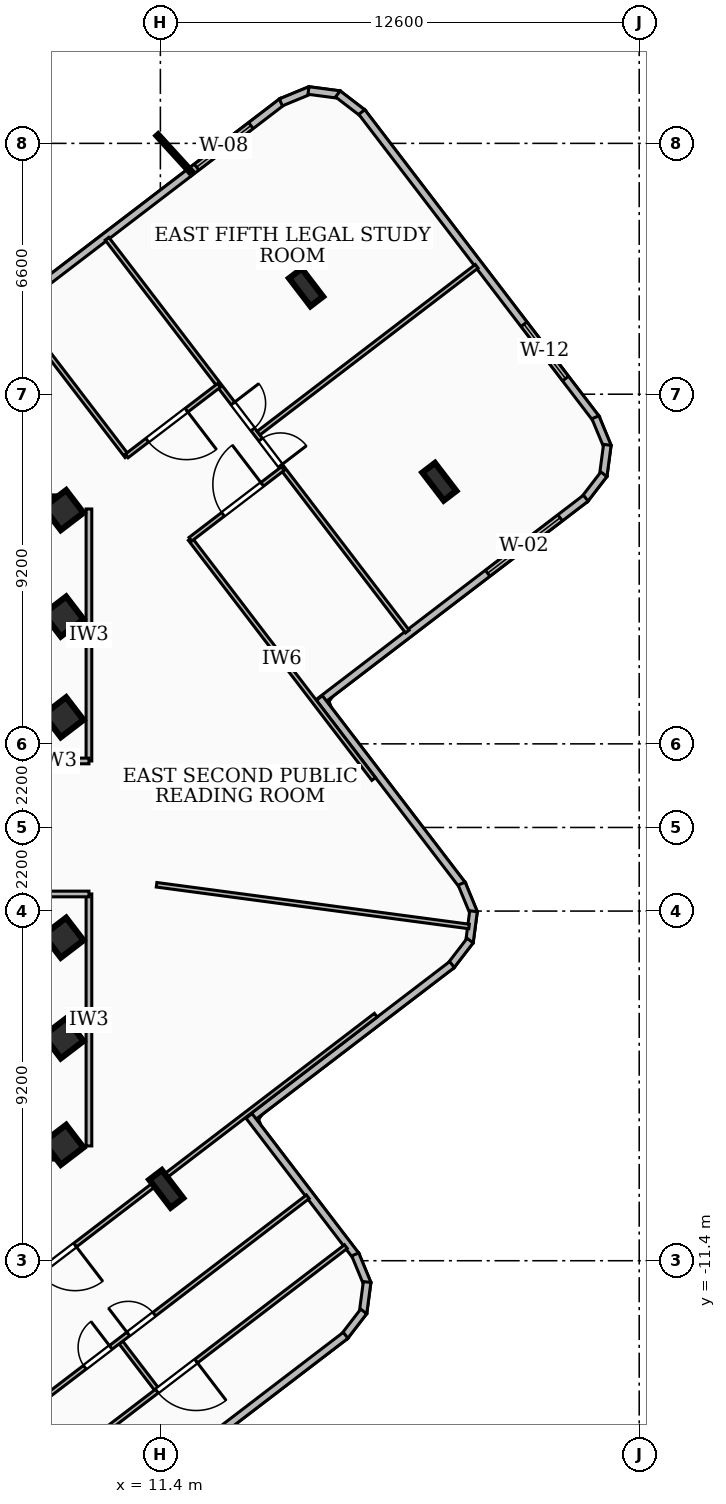
"""IFC4 building model, lengths in metres.
Left out: names, types, materials, properties, quantities, classifications, styles, units other than length and angle.
Written with IfcOpenShell. Run it as: python <this file> out.ifc"""

import sys

from ifc_helpers import new_model, si_unit, direction, frame, frame_2d, origin, origin_2d, place, context, subcontext, project, spatial, rectangle, i_section, extrude, element, fill, save


model = new_model("IFC4")
c1 = context("Model", 3, precision=1e-05, world=origin(), true_north=direction((0.0, 1.0)))
c2 = subcontext(c1, "Body", "Model", "MODEL_VIEW")
j1 = project(units=[si_unit("LENGTHUNIT", "METRE"), si_unit("PLANEANGLEUNIT", "RADIAN")], contexts=[c1])
p1 = place(None, origin())
s1 = spatial("IfcSite", under=j1, at=p1, CompositionType="ELEMENT")
p2 = place(p1, origin())
s2 = spatial("IfcBuilding", under=s1, at=p2, CompositionType="ELEMENT")
p3 = place(p2, frame((0.0, 0.0, 229.14)))
s3 = spatial("IfcBuildingStorey", under=s2, at=p3, CompositionType="ELEMENT", Elevation=229.14)
for number, where, z_axis, x_axis in (
    (1, (-8.78, 8.51, 0.0), (0.0, 0.0, 1.0), (1.0, 0.0, 0.0)),
    (2, (8.78, -8.51, 0.0), (0.0, 0.0, 1.0), (-1.0, 0.0, 0.0)),
):
    element("IfcWall", number, at=place(p3, frame(where, z_axis=z_axis, x_axis=x_axis)), inside=s3, PredefinedType="SHEAR", context=c2, shape_type="SweptSolid", body=[
        extrude(rectangle(XDim=17.56, YDim=0.4, at=frame_2d((8.78, 0.0))), origin(), (0.0, 0.0, 1.0), 3.14),
    ])
for number, where, z_axis, x_axis in (
    (3, (8.85, -5.55, 0.0), (0.0, 0.0, 1.0), (0.794, 0.607, 0.0)),
    (4, (8.85, -2.9, 0.0), (0.0, 0.0, 1.0), (0.794, 0.607, 0.0)),
    (5, (8.85, 2.9, 0.0), (0.0, 0.0, 1.0), (0.794, 0.607, 0.0)),
    (6, (8.85, 5.55, 0.0), (0.0, 0.0, 1.0), (0.794, 0.607, 0.0)),
    (7, (8.85, -8.35, 0.0), (0.0, 0.0, 1.0), (0.794, 0.607, 0.0)),
    (8, (8.85, 8.35, 0.0), (0.0, 0.0, 1.0), (0.794, 0.607, 0.0)),
):
    element("IfcColumn", number, at=place(p3, frame(where, z_axis=z_axis, x_axis=x_axis)), inside=s3, PredefinedType="COLUMN", context=c2, shape_type="SweptSolid", body=[
        extrude(rectangle(XDim=0.75, YDim=0.75, at=origin_2d()), origin(), (0.0, 0.0, 1.0), 3.42),
    ])
for number, where, z_axis, x_axis in (
    (9, (18.741, 9.097, 0.0), (0.0, 0.0, 1.0), (0.794, 0.607, 0.0)),
    (10, (15.234, 14.209, 0.0), (0.0, 0.0, 1.0), (0.794, 0.607, 0.0)),
    (11, (11.554, -9.51, 0.0), (0.0, 0.0, 1.0), (0.794, 0.607, 0.0)),
):
    element("IfcColumn", number, at=place(p3, frame(where, z_axis=z_axis, x_axis=x_axis)), inside=s3, PredefinedType="COLUMN", context=c2, shape_type="SweptSolid", body=[
        extrude(i_section(OverallWidth=0.418, OverallDepth=0.927, WebThickness=0.019, FlangeThickness=0.032, at=origin_2d()), origin(), (0.0, 0.0, 1.0), 3.42),
    ])
p4 = place(p3, frame((7.589, 13.732, 0.0), z_axis=(0.0, 0.0, 1.0), x_axis=(0.794365670067, 0.607439858932, 0.0)))
e12 = element("IfcWall", 12, at=p4, inside=s3, PredefinedType="SOLIDWALL", context=c2, shape_type="SweptSolid", body=[
    extrude(rectangle(XDim=8.842, YDim=0.2, at=frame_2d((4.421, 0.0))), origin(), (0.0, 0.0, 1.0), 3.14),
])
p5 = place(p4, frame((5.997, 0.0, 0.85)))
e13 = element("IfcOpeningElement", 13, at=p5, cuts=e12, PredefinedType="OPENING", context=c2, shape_type="SweptSolid", body=[
    extrude(rectangle(XDim=1.8, YDim=1.8, at=frame_2d((0.9, 0.9))), frame((0.0, 0.11, 0.0), z_axis=(0.0, -1.0, 0.0), x_axis=(1.0, 0.0, 0.0)), (0.0, 0.0, 1.0), 0.22),
])
p6 = place(p3, frame((14.57, 19.078, 0.0), z_axis=(0.0, 0.0, 1.0), x_axis=(0.92426142649, 0.38176015442, 0.0)))
e14 = element("IfcWall", 14, at=p6, inside=s3, PredefinedType="SOLIDWALL", context=c2, shape_type="SweptSolid", body=[
    extrude(rectangle(XDim=0.838, YDim=0.2, at=frame_2d((0.419, 0.0))), origin(), (0.0, 0.0, 1.0), 3.14),
])
p7 = place(p3, frame((15.297, 19.391, 0.0), z_axis=(0.0, 0.0, 1.0), x_axis=(0.991369477691, -0.131097516005, 0.0)))
e15 = element("IfcWall", 15, at=p7, inside=s3, PredefinedType="SOLIDWALL", context=c2, shape_type="SweptSolid", body=[
    extrude(rectangle(XDim=0.825, YDim=0.2, at=frame_2d((0.413, 0.0))), origin(), (0.0, 0.0, 1.0), 3.14),
])
p8 = place(p3, frame((16.07, 19.301, 0.0), z_axis=(0.0, 0.0, 1.0), x_axis=(0.792959338773, -0.609274558022, 0.0)))
e16 = element("IfcWall", 16, at=p8, inside=s3, PredefinedType="SOLIDWALL", context=c2, shape_type="SweptSolid", body=[
    extrude(rectangle(XDim=0.839, YDim=0.2, at=frame_2d((0.419, 0.0))), origin(), (0.0, 0.0, 1.0), 3.14),
])
p9 = place(p3, frame((16.7, 18.825, 0.0), z_axis=(0.0, 0.0, 1.0), x_axis=(0.607273554345, -0.794492813179, 0.0)))
e17 = element("IfcWall", 17, at=p9, inside=s3, PredefinedType="SOLIDWALL", context=c2, shape_type="SweptSolid", body=[
    extrude(rectangle(XDim=10.164, YDim=0.2, at=frame_2d((5.082, 0.0))), origin(), (0.0, 0.0, 1.0), 3.14),
])
p10 = place(p9, frame((7.028, 0.0, 0.85)))
e18 = element("IfcOpeningElement", 18, at=p10, cuts=e17, PredefinedType="OPENING", context=c2, shape_type="SweptSolid", body=[
    extrude(rectangle(XDim=1.8, YDim=1.6, at=frame_2d((0.9, 0.8))), frame((0.0, 0.11, 0.0), z_axis=(0.0, -1.0, 0.0), x_axis=(1.0, 0.0, 0.0)), (0.0, 0.0, 1.0), 0.22),
])
p11 = place(p3, frame((22.847, 10.793, 0.0), z_axis=(0.0, 0.0, 1.0), x_axis=(0.383166624649, -0.923679239647, 0.0)))
e19 = element("IfcWall", 19, at=p11, inside=s3, PredefinedType="SOLIDWALL", context=c2, shape_type="SweptSolid", body=[
    extrude(rectangle(XDim=0.838, YDim=0.2, at=frame_2d((0.419, 0.0))), origin(), (0.0, 0.0, 1.0), 3.14),
])
p12 = place(p3, frame((23.161, 10.067, 0.0), z_axis=(0.0, 0.0, 1.0), x_axis=(-0.131969898809, -0.991253724234, 0.0)))
e20 = element("IfcWall", 20, at=p12, inside=s3, PredefinedType="SOLIDWALL", context=c2, shape_type="SweptSolid", body=[
    extrude(rectangle(XDim=0.825, YDim=0.2, at=frame_2d((0.413, 0.0))), origin(), (0.0, 0.0, 1.0), 3.14),
])
p13 = place(p3, frame((23.07, 9.294, 0.0), z_axis=(0.0, 0.0, 1.0), x_axis=(-0.609274558022, -0.792959338773, 0.0)))
e21 = element("IfcWall", 21, at=p13, inside=s3, PredefinedType="SOLIDWALL", context=c2, shape_type="SweptSolid", body=[
    extrude(rectangle(XDim=0.839, YDim=0.2, at=frame_2d((0.419, 0.0))), origin(), (0.0, 0.0, 1.0), 3.14),
])
p14 = place(p3, frame((22.594, 8.664, 0.0), z_axis=(0.0, 0.0, 1.0), x_axis=(-0.794406416539, -0.607386569954, 0.0)))
e22 = element("IfcWall", 22, at=p14, inside=s3, PredefinedType="SOLIDWALL", context=c2, shape_type="SweptSolid", body=[
    extrude(rectangle(XDim=8.843, YDim=0.2, at=frame_2d((4.421, 0.0))), origin(), (0.0, 0.0, 1.0), 3.14),
])
p15 = place(p14, frame((0.85, 0.0, 0.85)))
e23 = element("IfcOpeningElement", 23, at=p15, cuts=e22, PredefinedType="OPENING", context=c2, shape_type="SweptSolid", body=[
    extrude(rectangle(XDim=2.4, YDim=2.1, at=frame_2d((1.2, 1.05))), frame((0.0, 0.11, 0.0), z_axis=(0.0, -1.0, 0.0), x_axis=(1.0, 0.0, 0.0)), (0.0, 0.0, 1.0), 0.22),
])
p16 = place(p3, frame((15.584, 3.406, 0.0), z_axis=(0.0, 0.0, 1.0), x_axis=(0.60748663121, -0.794329901805, 0.0)))
e24 = element("IfcWall", 24, at=p16, inside=s3, PredefinedType="SOLIDWALL", context=c2, shape_type="SweptSolid", body=[
    extrude(rectangle(XDim=6.203, YDim=0.2, at=frame_2d((3.101, 0.0))), origin(), (0.0, 0.0, 1.0), 3.14),
])
p17 = place(p3, frame((19.327, -1.478, 0.0), z_axis=(0.0, 0.0, 1.0), x_axis=(0.382171551451, -0.924091394431, 0.0)))
e25 = element("IfcWall", 25, at=p17, inside=s3, PredefinedType="SOLIDWALL", context=c2, shape_type="SweptSolid", body=[
    extrude(rectangle(XDim=0.837, YDim=0.2, at=frame_2d((0.419, 0.0))), origin(), (0.0, 0.0, 1.0), 3.14),
])
p18 = place(p3, frame((19.64, -2.204, 0.0), z_axis=(0.0, 0.0, 1.0), x_axis=(-0.130806653943, -0.99140789753, 0.0)))
e26 = element("IfcWall", 26, at=p18, inside=s3, PredefinedType="SOLIDWALL", context=c2, shape_type="SweptSolid", body=[
    extrude(rectangle(XDim=0.825, YDim=0.2, at=frame_2d((0.413, 0.0))), origin(), (0.0, 0.0, 1.0), 3.14),
])
p19 = place(p3, frame((19.55, -2.977, 0.0), z_axis=(0.0, 0.0, 1.0), x_axis=(-0.609274558022, -0.792959338773, 0.0)))
e27 = element("IfcWall", 27, at=p19, inside=s3, PredefinedType="SOLIDWALL", context=c2, shape_type="SweptSolid", body=[
    extrude(rectangle(XDim=0.839, YDim=0.2, at=frame_2d((0.419, 0.0))), origin(), (0.0, 0.0, 1.0), 3.14),
])
p20 = place(p3, frame((19.074, -3.607, 0.0), z_axis=(0.0, 0.0, 1.0), x_axis=(-0.794465731546, -0.607308983466, 0.0)))
e28 = element("IfcWall", 28, at=p20, inside=s3, PredefinedType="SOLIDWALL", context=c2, shape_type="SweptSolid", body=[
    extrude(rectangle(XDim=6.743, YDim=0.2, at=frame_2d((3.372, 0.0))), origin(), (0.0, 0.0, 1.0), 3.14),
])
p21 = place(p3, frame((13.732, -7.589, 0.0), z_axis=(0.0, 0.0, 1.0), x_axis=(0.607428636372, -0.794374251669, 0.0)))
e29 = element("IfcWall", 29, at=p21, inside=s3, PredefinedType="SOLIDWALL", context=c2, shape_type="SweptSolid", body=[
    extrude(rectangle(XDim=4.643, YDim=0.2, at=frame_2d((2.321, 0.0))), origin(), (0.0, 0.0, 1.0), 3.14),
])
p22 = place(p3, frame((16.527, -11.234, 0.0), z_axis=(0.0, 0.0, 1.0), x_axis=(0.381408676087, -0.924406524104, 0.0)))
e30 = element("IfcWall", 30, at=p22, inside=s3, PredefinedType="SOLIDWALL", context=c2, shape_type="SweptSolid", body=[
    extrude(rectangle(XDim=0.839, YDim=0.2, at=frame_2d((0.419, 0.0))), origin(), (0.0, 0.0, 1.0), 3.14),
])
p23 = place(p3, frame((16.84, -11.961, 0.0), z_axis=(0.0, 0.0, 1.0), x_axis=(-0.131059066172, -0.991374561492, 0.0)))
e31 = element("IfcWall", 31, at=p23, inside=s3, PredefinedType="SOLIDWALL", context=c2, shape_type="SweptSolid", body=[
    extrude(rectangle(XDim=0.825, YDim=0.2, at=frame_2d((0.413, 0.0))), origin(), (0.0, 0.0, 1.0), 3.14),
])
p24 = place(p3, frame((16.75, -12.734, 0.0), z_axis=(0.0, 0.0, 1.0), x_axis=(-0.609837482774, -0.792526494575, 0.0)))
e32 = element("IfcWall", 32, at=p24, inside=s3, PredefinedType="SOLIDWALL", context=c2, shape_type="SweptSolid", body=[
    extrude(rectangle(XDim=0.838, YDim=0.2, at=frame_2d((0.419, 0.0))), origin(), (0.0, 0.0, 1.0), 3.14),
])
p25 = place(p3, frame((16.274, -13.363, 0.0), z_axis=(0.0, 0.0, 1.0), x_axis=(-0.794458044917, -0.607319038781, 0.0)))
e33 = element("IfcWall", 33, at=p25, inside=s3, PredefinedType="SOLIDWALL", context=c2, shape_type="SweptSolid", body=[
    extrude(rectangle(XDim=10.164, YDim=0.2, at=frame_2d((5.082, 0.0))), origin(), (0.0, 0.0, 1.0), 3.14),
])
p26 = place(p25, frame((6.728, 0.0, 0.85)))
e34 = element("IfcOpeningElement", 34, at=p26, cuts=e33, PredefinedType="OPENING", context=c2, shape_type="SweptSolid", body=[
    extrude(rectangle(XDim=2.4, YDim=2.1, at=frame_2d((1.2, 1.05))), frame((0.0, 0.11, 0.0), z_axis=(0.0, -1.0, 0.0), x_axis=(1.0, 0.0, 0.0)), (0.0, 0.0, 1.0), 0.22),
])
p27 = place(p3, frame((9.52, 1.75, 0.0), z_axis=(0.0, 0.0, 1.0), x_axis=(0.0, 1.0, 0.0)))
e35 = element("IfcWall", 35, at=p27, inside=s3, PredefinedType="PARTITIONING", context=c2, shape_type="SweptSolid", body=[
    extrude(rectangle(XDim=6.63, YDim=0.15, at=frame_2d((3.315, 0.0))), origin(), (0.0, 0.0, 1.0), 2.51),
])
p28 = place(p3, frame((7.85, 1.75, 0.0), z_axis=(0.0, 0.0, 1.0), x_axis=(1.0, 0.0, 0.0)))
e36 = element("IfcWall", 36, at=p28, inside=s3, PredefinedType="PARTITIONING", context=c2, shape_type="SweptSolid", body=[
    extrude(rectangle(XDim=1.67, YDim=0.15, at=frame_2d((0.835, 0.0))), origin(), (0.0, 0.0, 1.0), 2.37),
])
p29 = place(p3, frame((9.52, -8.38, 0.0), z_axis=(0.0, 0.0, 1.0), x_axis=(0.0, 1.0, 0.0)))
e37 = element("IfcWall", 37, at=p29, inside=s3, PredefinedType="PARTITIONING", context=c2, shape_type="SweptSolid", body=[
    extrude(rectangle(XDim=6.63, YDim=0.15, at=frame_2d((3.315, 0.0))), origin(), (0.0, 0.0, 1.0), 3.14),
])
p30 = place(p3, frame((7.85, -1.75, 0.0), z_axis=(0.0, 0.0, 1.0), x_axis=(1.0, 0.0, 0.0)))
e38 = element("IfcWall", 38, at=p30, inside=s3, PredefinedType="PARTITIONING", context=c2, shape_type="SweptSolid", body=[
    extrude(rectangle(XDim=1.67, YDim=0.15, at=frame_2d((0.835, 0.0))), origin(), (0.0, 0.0, 1.0), 2.37),
])
p31 = place(p3, frame((11.3, -1.508, 0.0), z_axis=(0.0, 0.0, 1.0), x_axis=(0.99121735818, -0.132242764804, 0.0)))
e39 = element("IfcWall", 39, at=p31, inside=s3, PredefinedType="PARTITIONING", context=c2, shape_type="SweptSolid", body=[
    extrude(rectangle(XDim=8.295, YDim=0.12, at=frame_2d((4.147, 0.0))), origin(), (0.0, 0.0, 1.0), 3.14),
])
p32 = place(p3, frame((10.52, 9.768, 0.0), z_axis=(0.0, 0.0, 1.0), x_axis=(-0.607441568234, 0.794364362985, 0.0)))
e40 = element("IfcWall", 40, at=p32, inside=s3, PredefinedType="PARTITIONING", context=c2, shape_type="SweptSolid", body=[
    extrude(rectangle(XDim=8.49, YDim=0.12, at=frame_2d((4.245, 0.0))), origin(), (0.0, 0.0, 1.0), 2.51),
])
p33 = place(p3, frame((17.012, 1.275, 0.0), z_axis=(0.0, 0.0, 1.0), x_axis=(-0.60728139249, 0.794486822003, 0.0)))
e41 = element("IfcWall", 41, at=p33, inside=s3, PredefinedType="PARTITIONING", context=c2, shape_type="SweptSolid", body=[
    extrude(rectangle(XDim=7.95, YDim=0.12, at=frame_2d((3.975, 0.0))), origin(), (0.0, 0.0, 1.0), 3.14),
])
p34 = place(p3, frame((12.945, 11.634, 0.0), z_axis=(0.0, 0.0, 1.0), x_axis=(-0.794509541066, -0.607251668714, 0.0)))
e42 = element("IfcWall", 42, at=p34, inside=s3, PredefinedType="PARTITIONING", context=c2, shape_type="SweptSolid", body=[
    extrude(rectangle(XDim=3.06, YDim=0.12, at=frame_2d((1.53, 0.0))), origin(), (0.0, 0.0, 1.0), 2.51),
])
p35 = place(p34, frame((1.08, 0.0, 0.0)))
e43 = element("IfcOpeningElement", 43, at=p35, cuts=e42, PredefinedType="OPENING", context=c2, shape_type="SweptSolid", body=[
    extrude(rectangle(XDim=1.3, YDim=2.1, at=frame_2d((0.65, 1.05))), frame((0.0, 0.07, 0.0), z_axis=(0.0, -1.0, 0.0), x_axis=(1.0, 0.0, 0.0)), (0.0, 0.0, 1.0), 0.14),
])
p36 = place(p3, frame((12.19, 7.583, 0.0), z_axis=(0.0, 0.0, 1.0), x_axis=(0.794394061013, 0.607402729519, 0.0)))
e44 = element("IfcWall", 44, at=p36, inside=s3, PredefinedType="PARTITIONING", context=c2, shape_type="SweptSolid", body=[
    extrude(rectangle(XDim=3.06, YDim=0.12, at=frame_2d((1.53, 0.0))), origin(), (0.0, 0.0, 1.0), 2.51),
])
p37 = place(p36, frame((1.08, 0.0, 0.0)))
e45 = element("IfcOpeningElement", 45, at=p37, cuts=e44, PredefinedType="OPENING", context=c2, shape_type="SweptSolid", body=[
    extrude(rectangle(XDim=1.3, YDim=2.1, at=frame_2d((0.65, 1.05))), frame((0.0, 0.07, 0.0), z_axis=(0.0, -1.0, 0.0), x_axis=(1.0, 0.0, 0.0)), (0.0, 0.0, 1.0), 0.14),
])
p38 = place(p3, frame((13.983, 10.376, 0.0), z_axis=(0.0, 0.0, 1.0), x_axis=(0.794405792036, 0.607387386747, 0.0)))
e46 = element("IfcWall", 46, at=p38, inside=s3, PredefinedType="PARTITIONING", context=c2, shape_type="SweptSolid", body=[
    extrude(rectangle(XDim=7.224, YDim=0.12, at=frame_2d((3.612, 0.0))), origin(), (0.0, 0.0, 1.0), 3.14),
])
p39 = place(p3, frame((9.996, 15.491, 0.0), z_axis=(0.0, 0.0, 1.0), x_axis=(0.607384628916, -0.794407900613, 0.0)))
e47 = element("IfcWall", 47, at=p39, inside=s3, PredefinedType="PARTITIONING", context=c2, shape_type="SweptSolid", body=[
    extrude(rectangle(XDim=13.01, YDim=0.12, at=frame_2d((6.505, 0.0))), origin(), (0.0, 0.0, 1.0), 2.51),
])
p40 = place(p39, frame((6.655, 0.0, 0.0)))
e48 = element("IfcOpeningElement", 48, at=p40, cuts=e47, PredefinedType="OPENING", context=c2, shape_type="SweptSolid", body=[
    extrude(rectangle(XDim=0.86, YDim=2.04, at=frame_2d((0.43, 1.02))), frame((0.0, 0.07, 0.0), z_axis=(0.0, -1.0, 0.0), x_axis=(1.0, 0.0, 0.0)), (0.0, 0.0, 1.0), 0.14),
])
p41 = place(p39, frame((5.455, 0.0, 0.0)))
e49 = element("IfcOpeningElement", 49, at=p41, cuts=e47, PredefinedType="OPENING", context=c2, shape_type="SweptSolid", body=[
    extrude(rectangle(XDim=0.86, YDim=2.04, at=frame_2d((0.43, 1.02))), frame((0.0, 0.07, 0.0), z_axis=(0.0, -1.0, 0.0), x_axis=(1.0, 0.0, 0.0)), (0.0, 0.0, 1.0), 0.14),
])
p42 = place(p3, frame((17.068, -4.939, 0.0), z_axis=(0.0, 0.0, 1.0), x_axis=(-0.794433927634, -0.607350586255, 0.0)))
e50 = element("IfcWall", 50, at=p42, inside=s3, PredefinedType="PARTITIONING", context=c2, shape_type="SweptSolid", body=[
    extrude(rectangle(XDim=20.58, YDim=0.12, at=frame_2d((10.29, 0.0))), origin(), (0.0, 0.0, 1.0), 2.51),
])
p43 = place(p42, frame((9.96, 0.0, 0.0)))
e51 = element("IfcOpeningElement", 51, at=p43, cuts=e50, PredefinedType="OPENING", context=c2, shape_type="SweptSolid", body=[
    extrude(rectangle(XDim=1.2, YDim=2.1, at=frame_2d((0.6, 1.05))), frame((0.0, 0.07, 0.0), z_axis=(0.0, -1.0, 0.0), x_axis=(1.0, 0.0, 0.0)), (0.0, 0.0, 1.0), 0.14),
])
p44 = place(p3, frame((10.362, -13.553, 0.0), z_axis=(0.0, 0.0, 1.0), x_axis=(0.6073553069, -0.794430318644, 0.0)))
e52 = element("IfcWall", 52, at=p44, inside=s3, PredefinedType="PARTITIONING", context=c2, shape_type="SweptSolid", body=[
    extrude(rectangle(XDim=1.53, YDim=0.12, at=frame_2d((0.765, 0.0))), origin(), (0.0, 0.0, 1.0), 3.14),
])
p45 = place(p3, frame((4.943, -17.62, 0.0), z_axis=(0.0, 0.0, 1.0), x_axis=(0.79442653656, 0.607360253893, 0.0)))
e53 = element("IfcWall", 53, at=p45, inside=s3, PredefinedType="PARTITIONING", context=c2, shape_type="SweptSolid", body=[
    extrude(rectangle(XDim=13.01, YDim=0.12, at=frame_2d((6.505, 0.0))), origin(), (0.0, 0.0, 1.0), 3.14),
])
p46 = place(p45, frame((5.625, 0.0, 0.0)))
e54 = element("IfcOpeningElement", 54, at=p46, cuts=e53, PredefinedType="OPENING", context=c2, shape_type="SweptSolid", body=[
    extrude(rectangle(XDim=0.86, YDim=2.04, at=frame_2d((0.43, 1.02))), frame((0.0, 0.07, 0.0), z_axis=(0.0, -1.0, 0.0), x_axis=(1.0, 0.0, 0.0)), (0.0, 0.0, 1.0), 0.14),
])
p47 = place(p45, frame((7.065, 0.0, 0.0)))
e55 = element("IfcOpeningElement", 55, at=p47, cuts=e53, PredefinedType="OPENING", context=c2, shape_type="SweptSolid", body=[
    extrude(rectangle(XDim=0.86, YDim=2.04, at=frame_2d((0.43, 1.02))), frame((0.0, 0.07, 0.0), z_axis=(0.0, -1.0, 0.0), x_axis=(1.0, 0.0, 0.0)), (0.0, 0.0, 1.0), 0.14),
])
p48 = place(p3, frame((16.281, -11.029, 0.0), z_axis=(0.0, 0.0, 1.0), x_axis=(-0.794435590649, -0.607348410973, 0.0)))
e56 = element("IfcWall", 56, at=p48, inside=s3, PredefinedType="PARTITIONING", context=c2, shape_type="SweptSolid", body=[
    extrude(rectangle(XDim=13.01, YDim=0.12, at=frame_2d((6.505, 0.0))), origin(), (0.0, 0.0, 1.0), 3.14),
])
p49 = place(p48, frame((4.96, 0.0, 0.0)))
e57 = element("IfcOpeningElement", 57, at=p49, cuts=e56, PredefinedType="OPENING", context=c2, shape_type="SweptSolid", body=[
    extrude(rectangle(XDim=1.3, YDim=2.1, at=frame_2d((0.65, 1.05))), frame((0.0, 0.07, 0.0), z_axis=(0.0, -1.0, 0.0), x_axis=(1.0, 0.0, 0.0)), (0.0, 0.0, 1.0), 0.14),
])
p50 = place(p5, origin())
e58 = element("IfcWindow", 58, at=p50, inside=s3, PartitioningType="SINGLE_PANEL", PredefinedType="WINDOW", context=c2, shape_type="SweptSolid", body=[
    extrude(rectangle(XDim=1.8, YDim=1.8, at=frame_2d((0.9, 0.9))), frame((0.0, 0.03, 0.0), z_axis=(0.0, -1.0, 0.0), x_axis=(1.0, 0.0, 0.0)), (0.0, 0.0, 1.0), 0.06),
])
fill(e13, e58)
p51 = place(p10, origin())
e59 = element("IfcWindow", 59, at=p51, inside=s3, PartitioningType="SINGLE_PANEL", PredefinedType="WINDOW", context=c2, shape_type="SweptSolid", body=[
    extrude(rectangle(XDim=1.8, YDim=1.6, at=frame_2d((0.9, 0.8))), frame((0.0, 0.03, 0.0), z_axis=(0.0, -1.0, 0.0), x_axis=(1.0, 0.0, 0.0)), (0.0, 0.0, 1.0), 0.06),
])
fill(e18, e59)
p52 = place(p15, origin())
e60 = element("IfcWindow", 60, at=p52, inside=s3, PartitioningType="SINGLE_PANEL", PredefinedType="WINDOW", context=c2, shape_type="SweptSolid", body=[
    extrude(rectangle(XDim=2.4, YDim=2.1, at=frame_2d((1.2, 1.05))), frame((0.0, 0.03, 0.0), z_axis=(0.0, -1.0, 0.0), x_axis=(1.0, 0.0, 0.0)), (0.0, 0.0, 1.0), 0.06),
])
fill(e23, e60)
p53 = place(p35, origin())
e61 = element("IfcDoor", 61, at=p53, inside=s3, OperationType="SINGLE_SWING_LEFT", PredefinedType="DOOR", context=c2, shape_type="SweptSolid", body=[
    extrude(rectangle(XDim=1.3, YDim=2.1, at=frame_2d((0.65, 1.05))), frame((0.0, 0.025, 0.0), z_axis=(0.0, -1.0, 0.0), x_axis=(1.0, 0.0, 0.0)), (0.0, 0.0, 1.0), 0.05),
])
fill(e43, e61)
p54 = place(p37, origin())
e62 = element("IfcDoor", 62, at=p54, inside=s3, OperationType="SINGLE_SWING_RIGHT", PredefinedType="DOOR", context=c2, shape_type="SweptSolid", body=[
    extrude(rectangle(XDim=1.3, YDim=2.1, at=frame_2d((0.65, 1.05))), frame((0.0, 0.025, 0.0), z_axis=(0.0, -1.0, 0.0), x_axis=(1.0, 0.0, 0.0)), (0.0, 0.0, 1.0), 0.05),
])
fill(e45, e62)
p55 = place(p40, origin())
e63 = element("IfcDoor", 63, at=p55, inside=s3, OperationType="SINGLE_SWING_RIGHT", PredefinedType="DOOR", context=c2, shape_type="SweptSolid", body=[
    extrude(rectangle(XDim=0.86, YDim=2.04, at=frame_2d((0.43, 1.02))), frame((0.0, 0.025, 0.0), z_axis=(0.0, -1.0, 0.0), x_axis=(1.0, 0.0, 0.0)), (0.0, 0.0, 1.0), 0.05),
])
fill(e48, e63)
p56 = place(p41, origin())
e64 = element("IfcDoor", 64, at=p56, inside=s3, OperationType="SINGLE_SWING_LEFT", PredefinedType="DOOR", context=c2, shape_type="SweptSolid", body=[
    extrude(rectangle(XDim=0.86, YDim=2.04, at=frame_2d((0.43, 1.02))), frame((0.0, 0.025, 0.0), z_axis=(0.0, -1.0, 0.0), x_axis=(1.0, 0.0, 0.0)), (0.0, 0.0, 1.0), 0.05),
])
fill(e49, e64)
p57 = place(p43, origin())
e65 = element("IfcDoor", 65, at=p57, inside=s3, OperationType="SINGLE_SWING_LEFT", PredefinedType="DOOR", context=c2, shape_type="SweptSolid", body=[
    extrude(rectangle(XDim=1.2, YDim=2.1, at=frame_2d((0.6, 1.05))), frame((0.0, 0.025, 0.0), z_axis=(0.0, -1.0, 0.0), x_axis=(1.0, 0.0, 0.0)), (0.0, 0.0, 1.0), 0.05),
])
fill(e51, e65)
p58 = place(p46, origin())
e66 = element("IfcDoor", 66, at=p58, inside=s3, OperationType="SINGLE_SWING_RIGHT", PredefinedType="DOOR", context=c2, shape_type="SweptSolid", body=[
    extrude(rectangle(XDim=0.86, YDim=2.04, at=frame_2d((0.43, 1.02))), frame((0.0, 0.025, 0.0), z_axis=(0.0, -1.0, 0.0), x_axis=(1.0, 0.0, 0.0)), (0.0, 0.0, 1.0), 0.05),
])
fill(e54, e66)
p59 = place(p47, origin())
e67 = element("IfcDoor", 67, at=p59, inside=s3, OperationType="SINGLE_SWING_LEFT", PredefinedType="DOOR", context=c2, shape_type="SweptSolid", body=[
    extrude(rectangle(XDim=0.86, YDim=2.04, at=frame_2d((0.43, 1.02))), frame((0.0, 0.025, 0.0), z_axis=(0.0, -1.0, 0.0), x_axis=(1.0, 0.0, 0.0)), (0.0, 0.0, 1.0), 0.05),
])
fill(e55, e67)
p60 = place(p49, origin())
e68 = element("IfcDoor", 68, at=p60, inside=s3, OperationType="SINGLE_SWING_LEFT", PredefinedType="DOOR", context=c2, shape_type="SweptSolid", body=[
    extrude(rectangle(XDim=1.3, YDim=2.1, at=frame_2d((0.65, 1.05))), frame((0.0, 0.025, 0.0), z_axis=(0.0, -1.0, 0.0), x_axis=(1.0, 0.0, 0.0)), (0.0, 0.0, 1.0), 0.05),
])
fill(e57, e68)
save(model, sys.argv[1])
